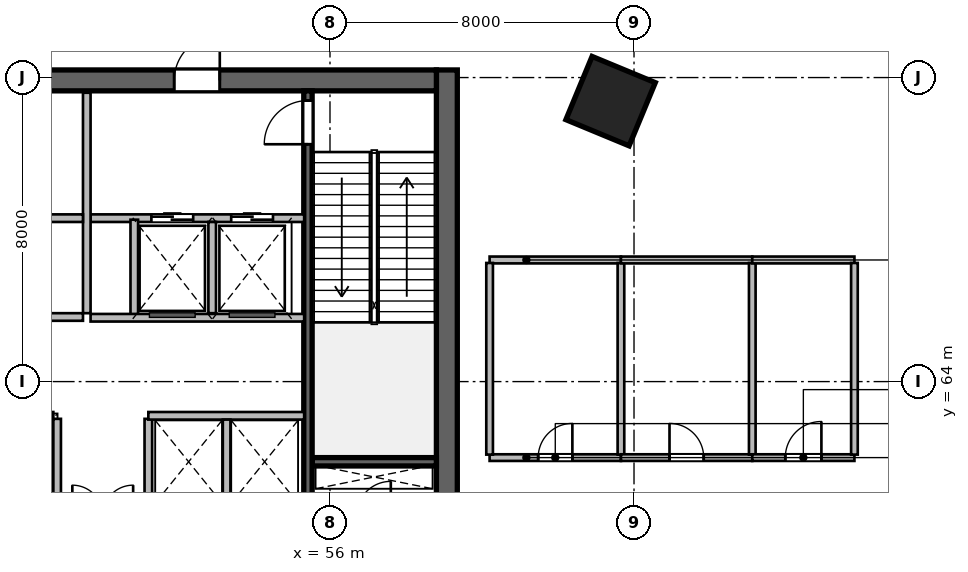
"""IFC4 building model, lengths in metres.
Left out: names, types, materials, properties, quantities, classifications, styles, units other than length and angle.
Written with IfcOpenShell. Run it as: python <this file> out.ifc"""

import sys

from ifc_helpers import new_model, si_unit, direction, frame, frame_2d, origin, origin_2d, place, context, subcontext, project, spatial, rectangle, extrude, source, transform, mapped, element, fill, save


model = new_model("IFC4")
c1 = context("Model", 3, precision=1e-05, world=origin(), true_north=direction((0.0, 1.0)))
c2 = subcontext(c1, "Body", "Model", "MODEL_VIEW")
j1 = project(units=[si_unit("LENGTHUNIT", "METRE"), si_unit("PLANEANGLEUNIT", "RADIAN")], contexts=[c1])
p1 = place(None, origin())
s1 = spatial("IfcSite", under=j1, at=p1, CompositionType="ELEMENT")
p2 = place(p1, origin())
s2 = spatial("IfcBuilding", under=s1, at=p2, CompositionType="ELEMENT")
p3 = place(p2, frame((0.0, 0.0, 24.0)))
s3 = spatial("IfcBuildingStorey", under=s2, at=p3, CompositionType="ELEMENT", Elevation=24.0)
m1 = source(origin(), c2, "Body", "SweptSolid", [
    extrude(rectangle(XDim=12.0, YDim=0.55, at=frame_2d((6.0, 0.0))), origin(), (0.0, 0.0, 1.0), 6.0),
])
p4 = place(p3, frame((59.075, 60.2, 0.0), z_axis=(0.0, 0.0, 1.0), x_axis=(0.0, 1.0, 0.0)))
e1 = element("IfcWall", 1, at=p4, inside=s3, PredefinedType="SHEAR", context=c2, shape_type="MappedRepresentation", body=[
    mapped(m1, transform((0.0, 0.0, 0.0), scale=1.0)),
])
m2 = source(origin(), c2, "Body", "SweptSolid", [
    extrude(rectangle(XDim=21.6, YDim=0.55, at=frame_2d((10.8, 0.0))), origin(), (0.0, 0.0, 1.0), 6.0),
])
p5 = place(p3, frame((37.2, 71.925, 0.0), z_axis=(0.0, 0.0, 1.0), x_axis=(1.0, 0.0, 0.0)))
e2 = element("IfcWall", 2, at=p5, inside=s3, PredefinedType="SHEAR", context=c2, shape_type="MappedRepresentation", body=[
    mapped(m2, transform((0.0, 0.0, 0.0), scale=1.0)),
])
p6 = place(p5, frame((1.2, 0.0, 0.0)))
e3 = element("IfcOpeningElement", 3, at=p6, cuts=e2, PredefinedType="OPENING", context=c2, shape_type="SweptSolid", body=[
    extrude(rectangle(XDim=0.9, YDim=2.1, at=frame_2d((0.45, 1.05))), frame((0.0, 0.285, 0.0), z_axis=(0.0, -1.0, 0.0), x_axis=(1.0, 0.0, 0.0)), (0.0, 0.0, 1.0), 0.57),
])
p7 = place(p5, frame((14.7, 0.0, 0.0)))
e4 = element("IfcOpeningElement", 4, at=p7, cuts=e2, PredefinedType="OPENING", context=c2, shape_type="SweptSolid", body=[
    extrude(rectangle(XDim=1.2, YDim=2.15, at=frame_2d((0.6, 1.075))), frame((0.0, 0.285, 0.0), z_axis=(0.0, -1.0, 0.0), x_axis=(1.0, 0.0, 0.0)), (0.0, 0.0, 1.0), 0.57),
])
p8 = place(p5, frame((4.15, 0.0, 0.0)))
e5 = element("IfcOpeningElement", 5, at=p8, cuts=e2, PredefinedType="OPENING", context=c2, shape_type="SweptSolid", body=[
    extrude(rectangle(XDim=1.3, YDim=2.15, at=frame_2d((0.65, 1.075))), frame((0.0, 0.285, 0.0), z_axis=(0.0, -1.0, 0.0), x_axis=(1.0, 0.0, 0.0)), (0.0, 0.0, 1.0), 0.57),
])
p9 = place(p5, frame((7.1, 0.0, 0.0)))
e6 = element("IfcOpeningElement", 6, at=p9, cuts=e2, PredefinedType="OPENING", context=c2, shape_type="SweptSolid", body=[
    extrude(rectangle(XDim=0.9, YDim=2.1, at=frame_2d((0.45, 1.05))), frame((0.0, 0.285, 0.0), z_axis=(0.0, -1.0, 0.0), x_axis=(1.0, 0.0, 0.0)), (0.0, 0.0, 1.0), 0.57),
])
m3 = source(origin(), c2, "Body", "SweptSolid", [
    extrude(rectangle(XDim=3.27, YDim=0.22, at=frame_2d((1.635, 0.0))), origin(), (0.0, 0.0, 1.0), 6.0),
])
p10 = place(p3, frame((55.53, 61.89, 0.0), z_axis=(0.0, 0.0, 1.0), x_axis=(1.0, 0.0, 0.0)))
e7 = element("IfcWall", 7, at=p10, inside=s3, PredefinedType="SHEAR", context=c2, shape_type="MappedRepresentation", body=[
    mapped(m3, transform((0.0, 0.0, 0.0), scale=1.0)),
])
m4 = source(origin(), c2, "Body", "SweptSolid", [
    extrude(rectangle(XDim=10.9, YDim=0.22, at=frame_2d((5.45, 0.0))), origin(), (0.0, 0.0, 1.0), 6.0),
])
p11 = place(p3, frame((55.42, 60.75, 0.0), z_axis=(0.0, 0.0, 1.0), x_axis=(0.0, 1.0, 0.0)))
e8 = element("IfcWall", 8, at=p11, inside=s3, PredefinedType="SHEAR", context=c2, shape_type="MappedRepresentation", body=[
    mapped(m4, transform((0.0, 0.0, 0.0), scale=1.0)),
])
p12 = place(p11, frame((9.495, 0.0, 0.0)))
e9 = element("IfcOpeningElement", 9, at=p12, cuts=e8, PredefinedType="OPENING", context=c2, shape_type="SweptSolid", body=[
    extrude(rectangle(XDim=1.15, YDim=2.15, at=frame_2d((0.575, 1.075))), frame((0.0, 0.12, 0.0), z_axis=(0.0, -1.0, 0.0), x_axis=(1.0, 0.0, 0.0)), (0.0, 0.0, 1.0), 0.24),
])
m5 = source(origin(), c2, "Body", "SweptSolid", [
    extrude(rectangle(XDim=1.8, YDim=1.8, at=origin_2d()), origin(), (0.0, 0.0, 1.0), 6.0),
])
p13 = place(p3, frame((63.384, 71.379, 0.0), z_axis=(0.0, 0.0, 1.0), x_axis=(0.382683432365, 0.923879532511, 0.0)))
e10 = element("IfcColumn", 10, at=p13, inside=s3, PredefinedType="COLUMN", context=c2, shape_type="MappedRepresentation", body=[
    mapped(m5, transform((0.0, 0.0, 0.0), scale=1.0)),
])
m6 = source(origin(), c2, "Body", "SweptSolid", [
    extrude(rectangle(XDim=5.667, YDim=0.35, at=frame_2d((2.833, 0.0))), origin(), (0.0, 0.0, 1.0), 5.55),
])
p14 = place(p3, frame((75.698, 72.147, 0.0), z_axis=(0.0, 0.0, 1.0), x_axis=(-0.873233089296, 0.487302751642, 0.0)))
e11 = element("IfcWall", 11, at=p14, inside=s3, PredefinedType="SOLIDWALL", context=c2, shape_type="MappedRepresentation", body=[
    mapped(m6, transform((0.0, 0.0, 0.0), scale=1.0)),
])
m7 = source(origin(), c2, "Body", "SweptSolid", [
    extrude(rectangle(XDim=2.24, YDim=0.2, at=frame_2d((1.12, 0.0))), origin(), (0.0, 0.0, 1.0), 5.55),
])
for number, where, z_axis, x_axis in (
    (12, (48.82, 60.78, 0.0), (0.0, 0.0, 1.0), (0.0, 1.0, 0.0)),
    (13, (51.22, 60.78, 0.0), (0.0, 0.0, 1.0), (0.0, 1.0, 0.0)),
):
    element("IfcWall", number, at=place(p3, frame(where, z_axis=z_axis, x_axis=x_axis)), inside=s3, PredefinedType="SOLIDWALL", context=c2, shape_type="MappedRepresentation", body=[
        mapped(m7, transform((0.0, 0.0, 0.0), scale=1.0)),
    ])
m8 = source(origin(), c2, "Body", "SweptSolid", [
    extrude(rectangle(XDim=5.62, YDim=0.2, at=frame_2d((2.81, 0.0))), origin(), (0.0, 0.0, 1.0), 5.55),
])
p15 = place(p3, frame((49.7, 68.3, 0.0), z_axis=(0.0, 0.0, 1.0), x_axis=(1.0, 0.0, 0.0)))
e14 = element("IfcWall", 14, at=p15, inside=s3, PredefinedType="SOLIDWALL", context=c2, shape_type="MappedRepresentation", body=[
    mapped(m8, transform((0.0, 0.0, 0.0), scale=1.0)),
])
p16 = place(p15, frame((1.6, 0.0, 0.0)))
e15 = element("IfcOpeningElement", 15, at=p16, cuts=e14, PredefinedType="OPENING", context=c2, shape_type="SweptSolid", body=[
    extrude(rectangle(XDim=1.1, YDim=2.15, at=frame_2d((0.55, 1.075))), frame((0.0, 0.11, 0.0), z_axis=(0.0, -1.0, 0.0), x_axis=(1.0, 0.0, 0.0)), (0.0, 0.0, 1.0), 0.22),
])
p17 = place(p15, frame((3.7, 0.0, 0.0)))
e16 = element("IfcOpeningElement", 16, at=p17, cuts=e14, PredefinedType="OPENING", context=c2, shape_type="SweptSolid", body=[
    extrude(rectangle(XDim=1.1, YDim=2.15, at=frame_2d((0.55, 1.075))), frame((0.0, 0.11, 0.0), z_axis=(0.0, -1.0, 0.0), x_axis=(1.0, 0.0, 0.0)), (0.0, 0.0, 1.0), 0.22),
])
m9 = source(origin(), c2, "Body", "SweptSolid", [
    extrude(rectangle(XDim=5.8, YDim=0.2, at=frame_2d((2.9, 0.0))), origin(), (0.0, 0.0, 1.0), 5.55),
])
p18 = place(p3, frame((49.6, 65.8, 0.0), z_axis=(0.0, 0.0, 1.0), x_axis=(0.0, 1.0, 0.0)))
e17 = element("IfcWall", 17, at=p18, inside=s3, PredefinedType="SOLIDWALL", context=c2, shape_type="MappedRepresentation", body=[
    mapped(m9, transform((0.0, 0.0, 0.0), scale=1.0)),
])
m10 = source(origin(), c2, "Body", "SweptSolid", [
    extrude(rectangle(XDim=2.58, YDim=0.2, at=frame_2d((1.29, 0.0))), origin(), (0.0, 0.0, 1.0), 5.55),
])
p19 = place(p3, frame((50.85, 65.68, 0.0), z_axis=(0.0, 0.0, 1.0), x_axis=(0.0, 1.0, 0.0)))
e18 = element("IfcWall", 18, at=p19, inside=s3, PredefinedType="SOLIDWALL", context=c2, shape_type="MappedRepresentation", body=[
    mapped(m10, transform((0.0, 0.0, 0.0), scale=1.0)),
])
m11 = source(origin(), c2, "Body", "SweptSolid", [
    extrude(rectangle(XDim=2.4, YDim=0.2, at=frame_2d((1.2, 0.0))), origin(), (0.0, 0.0, 1.0), 5.55),
])
p20 = place(p3, frame((52.9, 65.8, 0.0), z_axis=(0.0, 0.0, 1.0), x_axis=(0.0, 1.0, 0.0)))
e19 = element("IfcWall", 19, at=p20, inside=s3, PredefinedType="SOLIDWALL", context=c2, shape_type="MappedRepresentation", body=[
    mapped(m11, transform((0.0, 0.0, 0.0), scale=1.0)),
])
p21 = place(p3, frame((49.7, 65.68, 0.0), z_axis=(0.0, 0.0, 1.0), x_axis=(1.0, 0.0, 0.0)))
e20 = element("IfcWall", 20, at=p21, inside=s3, PredefinedType="SOLIDWALL", context=c2, shape_type="MappedRepresentation", body=[
    mapped(m8, transform((0.0, 0.0, 0.0), scale=1.0)),
])
m12 = source(origin(), c2, "Body", "SweptSolid", [
    extrude(rectangle(XDim=8.8, YDim=0.2, at=frame_2d((4.4, 0.0))), origin(), (0.0, 0.0, 1.0), 5.55),
])
p22 = place(p3, frame((40.7, 68.3, 0.0), z_axis=(0.0, 0.0, 1.0), x_axis=(1.0, 0.0, 0.0)))
e21 = element("IfcWall", 21, at=p22, inside=s3, PredefinedType="SOLIDWALL", context=c2, shape_type="MappedRepresentation", body=[
    mapped(m12, transform((0.0, 0.0, 0.0), scale=1.0)),
])
m13 = source(origin(), c2, "Body", "SweptSolid", [
    extrude(rectangle(XDim=8.02, YDim=0.2, at=frame_2d((4.01, 0.0))), origin(), (0.0, 0.0, 1.0), 5.55),
])
p23 = place(p3, frame((40.7, 63.1, 0.0), z_axis=(0.0, 0.0, 1.0), x_axis=(1.0, 0.0, 0.0)))
e22 = element("IfcWall", 22, at=p23, inside=s3, PredefinedType="SOLIDWALL", context=c2, shape_type="MappedRepresentation", body=[
    mapped(m13, transform((0.0, 0.0, 0.0), scale=1.0)),
])
p24 = place(p23, frame((0.72, 0.0, 0.0)))
e23 = element("IfcOpeningElement", 23, at=p24, cuts=e22, PredefinedType="OPENING", context=c2, shape_type="SweptSolid", body=[
    extrude(rectangle(XDim=1.0, YDim=2.15, at=frame_2d((0.5, 1.075))), frame((0.0, 0.11, 0.0), z_axis=(0.0, -1.0, 0.0), x_axis=(1.0, 0.0, 0.0)), (0.0, 0.0, 1.0), 0.22),
])
p25 = place(p23, frame((2.62, 0.0, 0.0)))
e24 = element("IfcOpeningElement", 24, at=p25, cuts=e22, PredefinedType="OPENING", context=c2, shape_type="SweptSolid", body=[
    extrude(rectangle(XDim=1.0, YDim=2.15, at=frame_2d((0.5, 1.075))), frame((0.0, 0.11, 0.0), z_axis=(0.0, -1.0, 0.0), x_axis=(1.0, 0.0, 0.0)), (0.0, 0.0, 1.0), 0.22),
])
p26 = place(p23, frame((4.55, 0.0, 0.0)))
e25 = element("IfcOpeningElement", 25, at=p26, cuts=e22, PredefinedType="OPENING", context=c2, shape_type="SweptSolid", body=[
    extrude(rectangle(XDim=1.0, YDim=2.15, at=frame_2d((0.5, 1.075))), frame((0.0, 0.11, 0.0), z_axis=(0.0, -1.0, 0.0), x_axis=(1.0, 0.0, 0.0)), (0.0, 0.0, 1.0), 0.22),
])
p27 = place(p23, frame((6.55, 0.0, 0.0)))
e26 = element("IfcOpeningElement", 26, at=p27, cuts=e22, PredefinedType="OPENING", context=c2, shape_type="SweptSolid", body=[
    extrude(rectangle(XDim=1.0, YDim=2.15, at=frame_2d((0.5, 1.075))), frame((0.0, 0.11, 0.0), z_axis=(0.0, -1.0, 0.0), x_axis=(1.0, 0.0, 0.0)), (0.0, 0.0, 1.0), 0.22),
])
m14 = source(origin(), c2, "Body", "SweptSolid", [
    extrude(rectangle(XDim=4.1, YDim=0.2, at=frame_2d((2.05, 0.0))), origin(), (0.0, 0.0, 1.0), 5.55),
])
p28 = place(p3, frame((51.22, 63.1, 0.0), z_axis=(0.0, 0.0, 1.0), x_axis=(1.0, 0.0, 0.0)))
e27 = element("IfcWall", 27, at=p28, inside=s3, PredefinedType="SOLIDWALL", context=c2, shape_type="MappedRepresentation", body=[
    mapped(m14, transform((0.0, 0.0, 0.0), scale=1.0)),
])
m15 = source(origin(), c2, "Body", "SweptSolid", [
    extrude(rectangle(XDim=2.2, YDim=0.2, at=frame_2d((1.1, 0.0))), origin(), (0.0, 0.0, 1.0), 5.55),
])
p29 = place(p3, frame((53.28, 60.8, 0.0), z_axis=(0.0, 0.0, 1.0), x_axis=(0.0, 1.0, 0.0)))
e28 = element("IfcWall", 28, at=p29, inside=s3, PredefinedType="SOLIDWALL", context=c2, shape_type="MappedRepresentation", body=[
    mapped(m15, transform((0.0, 0.0, 0.0), scale=1.0)),
])
p30 = place(p3, frame((40.7, 65.7, 0.0), z_axis=(0.0, 0.0, 1.0), x_axis=(1.0, 0.0, 0.0)))
e29 = element("IfcWall", 29, at=p30, inside=s3, PredefinedType="SOLIDWALL", context=c2, shape_type="MappedRepresentation", body=[
    mapped(m12, transform((0.0, 0.0, 0.0), scale=1.0)),
])
p31 = place(p30, frame((3.8, 0.0, 0.0)))
e30 = element("IfcOpeningElement", 30, at=p31, cuts=e29, PredefinedType="OPENING", context=c2, shape_type="SweptSolid", body=[
    extrude(rectangle(XDim=0.95, YDim=2.15, at=frame_2d((0.475, 1.075))), frame((0.0, 0.11, 0.0), z_axis=(0.0, -1.0, 0.0), x_axis=(1.0, 0.0, 0.0)), (0.0, 0.0, 1.0), 0.22),
])
m16 = source(origin(), c2, "Body", "SweptSolid", [
    extrude(rectangle(XDim=3.456, YDim=0.175, at=frame_2d((1.728, 0.0))), origin(), (0.0, 0.0, 1.0), 5.55),
])
p32 = place(p3, frame((60.2, 62.0, 0.0), z_axis=(0.0, 0.0, 1.0), x_axis=(1.0, 0.0, 0.0)))
e31 = element("IfcWall", 31, at=p32, inside=s3, PredefinedType="PARTITIONING", context=c2, shape_type="MappedRepresentation", body=[
    mapped(m16, transform((0.0, 0.0, 0.0), scale=1.0)),
])
p33 = place(p32, frame((1.278, 0.0, 0.0)))
e32 = element("IfcOpeningElement", 32, at=p33, cuts=e31, PredefinedType="OPENING", context=c2, shape_type="SweptSolid", body=[
    extrude(rectangle(XDim=0.9, YDim=2.08, at=frame_2d((0.45, 1.04))), frame((0.0, 0.098, 0.0), z_axis=(0.0, -1.0, 0.0), x_axis=(1.0, 0.0, 0.0)), (0.0, 0.0, 1.0), 0.195),
])
m17 = source(origin(), c2, "Body", "SweptSolid", [
    extrude(rectangle(XDim=3.456, YDim=0.18, at=frame_2d((1.728, 0.0))), origin(), (0.0, 0.0, 1.0), 5.55),
])
p34 = place(p3, frame((60.2, 67.2, 0.0), z_axis=(0.0, 0.0, 1.0), x_axis=(1.0, 0.0, 0.0)))
e33 = element("IfcWall", 33, at=p34, inside=s3, PredefinedType="PLUMBINGWALL", context=c2, shape_type="MappedRepresentation", body=[
    mapped(m17, transform((0.0, 0.0, 0.0), scale=1.0)),
])
m18 = source(origin(), c2, "Body", "SweptSolid", [
    extrude(rectangle(XDim=5.043, YDim=0.175, at=frame_2d((2.521, 0.0))), origin(), (0.0, 0.0, 1.0), 5.55),
])
for number, where, z_axis, x_axis in (
    (34, (60.2, 62.079, 0.0), (0.0, 0.0, 1.0), (0.0, 1.0, 0.0)),
    (35, (63.656, 62.079, 0.0), (0.0, 0.0, 1.0), (0.0, 1.0, 0.0)),
):
    element("IfcWall", number, at=place(p3, frame(where, z_axis=z_axis, x_axis=x_axis)), inside=s3, PredefinedType="PARTITIONING", context=c2, shape_type="MappedRepresentation", body=[
        mapped(m18, transform((0.0, 0.0, 0.0), scale=1.0)),
    ])
p35 = place(p3, frame((63.656, 62.0, 0.0), z_axis=(0.0, 0.0, 1.0), x_axis=(1.0, 0.0, 0.0)))
e36 = element("IfcWall", 36, at=p35, inside=s3, PredefinedType="PARTITIONING", context=c2, shape_type="MappedRepresentation", body=[
    mapped(m16, transform((0.0, 0.0, 0.0), scale=1.0)),
])
p36 = place(p35, frame((1.278, 0.0, 0.0)))
e37 = element("IfcOpeningElement", 37, at=p36, cuts=e36, PredefinedType="OPENING", context=c2, shape_type="SweptSolid", body=[
    extrude(rectangle(XDim=0.9, YDim=2.08, at=frame_2d((0.45, 1.04))), frame((0.0, 0.098, 0.0), z_axis=(0.0, -1.0, 0.0), x_axis=(1.0, 0.0, 0.0)), (0.0, 0.0, 1.0), 0.195),
])
p37 = place(p3, frame((63.656, 67.2, 0.0), z_axis=(0.0, 0.0, 1.0), x_axis=(1.0, 0.0, 0.0)))
e38 = element("IfcWall", 38, at=p37, inside=s3, PredefinedType="PLUMBINGWALL", context=c2, shape_type="MappedRepresentation", body=[
    mapped(m17, transform((0.0, 0.0, 0.0), scale=1.0)),
])
m19 = source(origin(), c2, "Body", "SweptSolid", [
    extrude(rectangle(XDim=5.043, YDim=0.175, at=frame_2d((2.521, 0.0))), origin(), (0.0, 0.0, 1.0), 2.66),
])
p38 = place(p3, frame((67.112, 62.079, 0.0), z_axis=(0.0, 0.0, 1.0), x_axis=(0.0, 1.0, 0.0)))
e39 = element("IfcWall", 39, at=p38, inside=s3, PredefinedType="PARTITIONING", context=c2, shape_type="MappedRepresentation", body=[
    mapped(m19, transform((0.0, 0.0, 0.0), scale=1.0)),
])
m20 = source(origin(), c2, "Body", "SweptSolid", [
    extrude(rectangle(XDim=2.688, YDim=0.175, at=frame_2d((1.344, 0.0))), origin(), (0.0, 0.0, 1.0), 5.55),
])
p39 = place(p3, frame((67.112, 62.0, 0.0), z_axis=(0.0, 0.0, 1.0), x_axis=(1.0, 0.0, 0.0)))
e40 = element("IfcWall", 40, at=p39, inside=s3, PredefinedType="PARTITIONING", context=c2, shape_type="MappedRepresentation", body=[
    mapped(m20, transform((0.0, 0.0, 0.0), scale=1.0)),
])
p40 = place(p39, frame((0.869, 0.0, 0.0)))
e41 = element("IfcOpeningElement", 41, at=p40, cuts=e40, PredefinedType="OPENING", context=c2, shape_type="SweptSolid", body=[
    extrude(rectangle(XDim=0.95, YDim=2.12, at=frame_2d((0.475, 1.06))), frame((0.0, 0.098, 0.0), z_axis=(0.0, -1.0, 0.0), x_axis=(1.0, 0.0, 0.0)), (0.0, 0.0, 1.0), 0.195),
])
m21 = source(origin(), c2, "Body", "SweptSolid", [
    extrude(rectangle(XDim=2.688, YDim=0.18, at=frame_2d((1.344, 0.0))), origin(), (0.0, 0.0, 1.0), 5.55),
])
p41 = place(p3, frame((67.112, 67.2, 0.0), z_axis=(0.0, 0.0, 1.0), x_axis=(1.0, 0.0, 0.0)))
e42 = element("IfcWall", 42, at=p41, inside=s3, PredefinedType="PLUMBINGWALL", context=c2, shape_type="MappedRepresentation", body=[
    mapped(m21, transform((0.0, 0.0, 0.0), scale=1.0)),
])
p42 = place(p3, frame((69.8, 62.079, 0.0), z_axis=(0.0, 0.0, 1.0), x_axis=(0.0, 1.0, 0.0)))
e43 = element("IfcWall", 43, at=p42, inside=s3, PredefinedType="PARTITIONING", context=c2, shape_type="MappedRepresentation", body=[
    mapped(m18, transform((0.0, 0.0, 0.0), scale=1.0)),
])
m22 = source(origin(), c2, "Body", "SweptSolid", [
    extrude(rectangle(XDim=1.15, YDim=2.15, at=frame_2d((0.575, 1.075))), frame((0.0, 0.025, 0.0), z_axis=(0.0, -1.0, 0.0), x_axis=(1.0, 0.0, 0.0)), (0.0, 0.0, 1.0), 0.05),
])
p43 = place(p12, origin())
e44 = element("IfcDoor", 44, at=p43, inside=s3, OperationType="SINGLE_SWING_LEFT", PredefinedType="DOOR", context=c2, shape_type="MappedRepresentation", body=[
    mapped(m22, transform((0.0, 0.0, 0.0), scale=1.0)),
])
fill(e9, e44)
m23 = source(origin(), c2, "Body", "SweptSolid", [
    extrude(rectangle(XDim=1.2, YDim=2.15, at=frame_2d((0.6, 1.075))), frame((0.0, 0.025, 0.0), z_axis=(0.0, -1.0, 0.0), x_axis=(1.0, 0.0, 0.0)), (0.0, 0.0, 1.0), 0.05),
])
p44 = place(p7, origin())
e45 = element("IfcDoor", 45, at=p44, inside=s3, OperationType="SINGLE_SWING_RIGHT", PredefinedType="DOOR", context=c2, shape_type="MappedRepresentation", body=[
    mapped(m23, transform((0.0, 0.0, 0.0), scale=1.0)),
])
fill(e4, e45)
m24 = source(origin(), c2, "Body", "SweptSolid", [
    extrude(rectangle(XDim=1.1, YDim=2.15, at=frame_2d((0.55, 1.075))), frame((0.0, 0.025, 0.0), z_axis=(0.0, -1.0, 0.0), x_axis=(1.0, 0.0, 0.0)), (0.0, 0.0, 1.0), 0.05),
])
p45 = place(p16, origin())
e46 = element("IfcDoor", 46, at=p45, inside=s3, OperationType="DOUBLE_DOOR_SLIDING", PredefinedType="DOOR", context=c2, shape_type="MappedRepresentation", body=[
    mapped(m24, transform((0.0, 0.0, 0.0), scale=1.0)),
])
fill(e15, e46)
p46 = place(p17, origin())
e47 = element("IfcDoor", 47, at=p46, inside=s3, OperationType="DOUBLE_DOOR_SLIDING", PredefinedType="DOOR", context=c2, shape_type="MappedRepresentation", body=[
    mapped(m24, transform((0.0, 0.0, 0.0), scale=1.0)),
])
fill(e16, e47)
m25 = source(origin(), c2, "Body", "SweptSolid", [
    extrude(rectangle(XDim=0.9, YDim=2.08, at=frame_2d((0.45, 1.04))), frame((0.0, 0.025, 0.0), z_axis=(0.0, -1.0, 0.0), x_axis=(1.0, 0.0, 0.0)), (0.0, 0.0, 1.0), 0.05),
])
p47 = place(p33, origin())
e48 = element("IfcDoor", 48, at=p47, inside=s3, OperationType="SINGLE_SWING_RIGHT", PredefinedType="DOOR", context=c2, shape_type="MappedRepresentation", body=[
    mapped(m25, transform((0.0, 0.0, 0.0), scale=1.0)),
])
fill(e32, e48)
p48 = place(p36, origin())
e49 = element("IfcDoor", 49, at=p48, inside=s3, OperationType="SINGLE_SWING_LEFT", PredefinedType="DOOR", context=c2, shape_type="MappedRepresentation", body=[
    mapped(m25, transform((0.0, 0.0, 0.0), scale=1.0)),
])
fill(e37, e49)
m26 = source(origin(), c2, "Body", "SweptSolid", [
    extrude(rectangle(XDim=0.95, YDim=2.12, at=frame_2d((0.475, 1.06))), frame((0.0, 0.025, 0.0), z_axis=(0.0, -1.0, 0.0), x_axis=(1.0, 0.0, 0.0)), (0.0, 0.0, 1.0), 0.05),
])
p49 = place(p40, origin())
e50 = element("IfcDoor", 50, at=p49, inside=s3, OperationType="SINGLE_SWING_RIGHT", PredefinedType="DOOR", context=c2, shape_type="MappedRepresentation", body=[
    mapped(m26, transform((0.0, 0.0, 0.0), scale=1.0)),
])
fill(e41, e50)
save(model, sys.argv[1])
